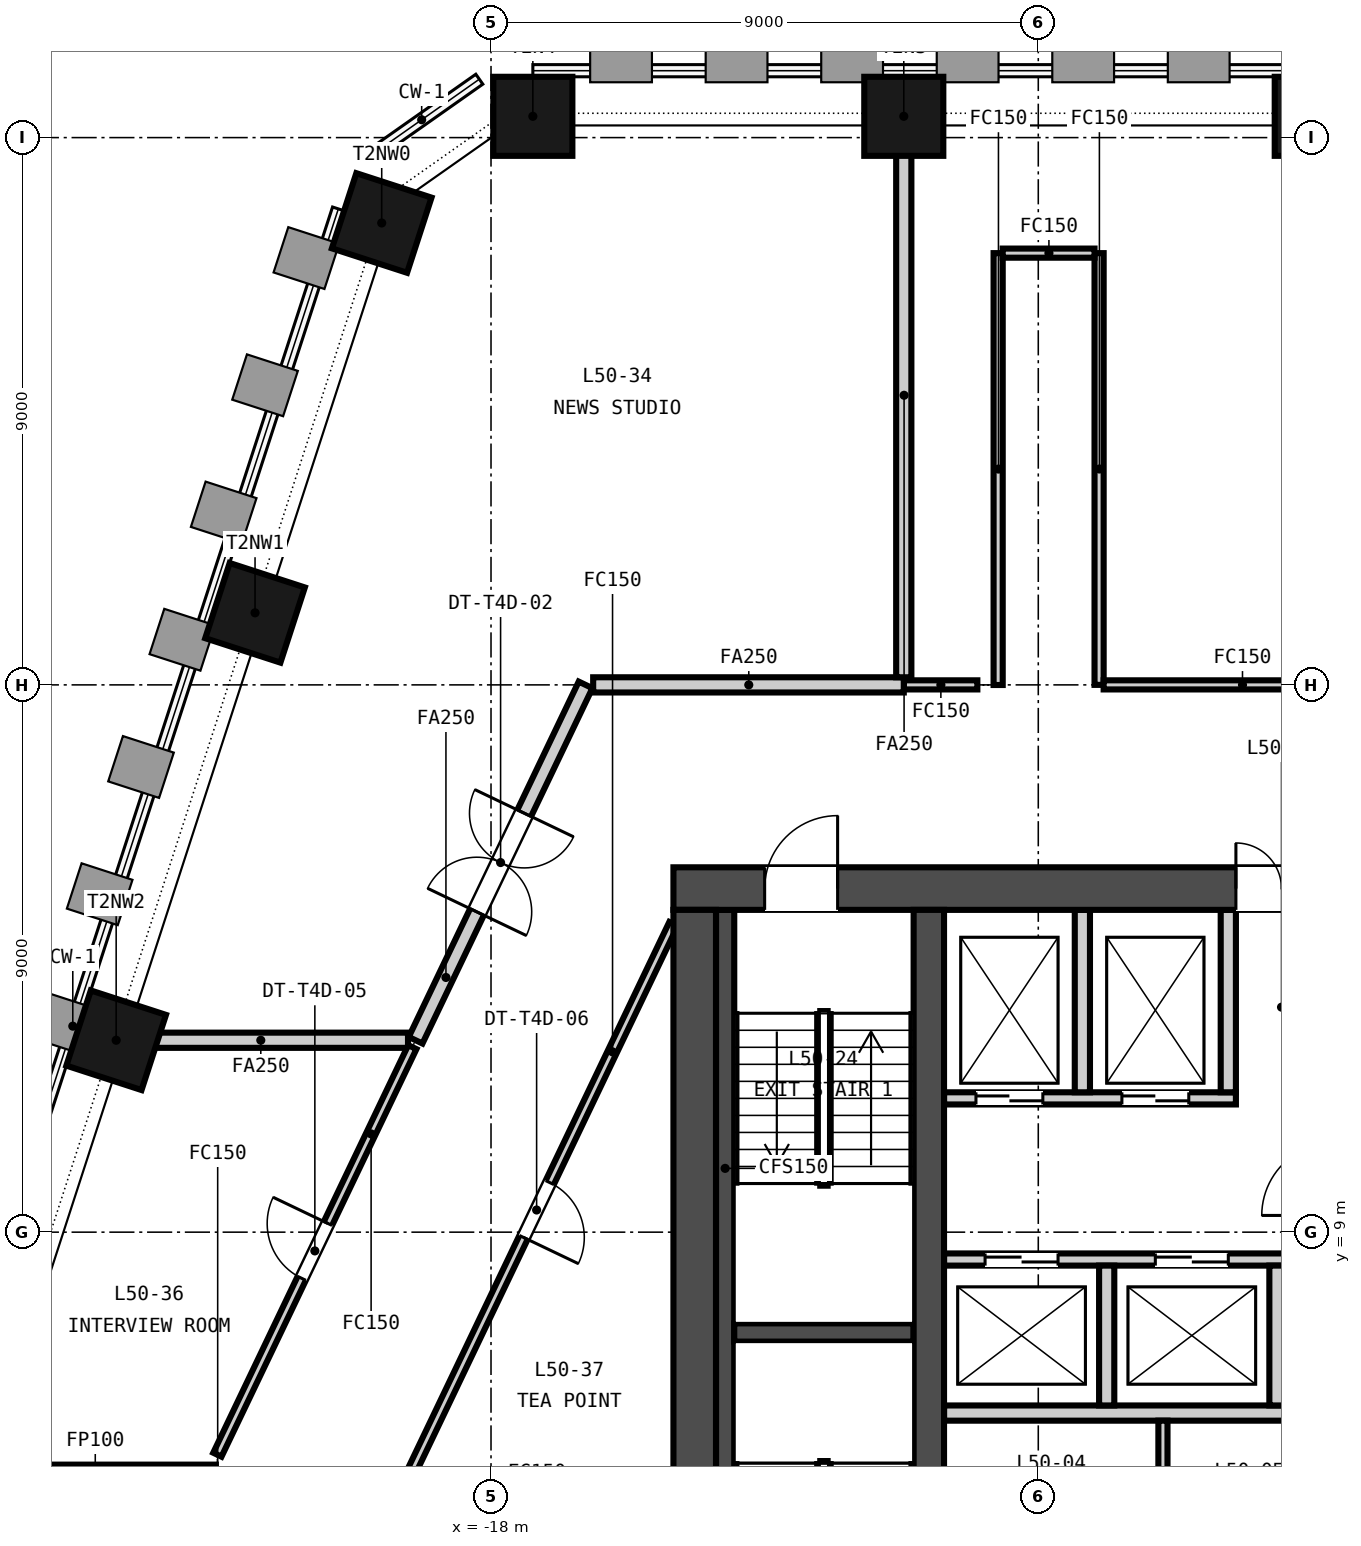
"""IFC4 building model, lengths in metres.
Left out: names, types, materials, properties, quantities, classifications, styles, units other than length and angle.
Written with IfcOpenShell. Run it as: python <this file> out.ifc"""

import sys

from ifc_helpers import new_model, si_unit, direction, frame, frame_2d, origin, origin_2d, place, context, subcontext, project, spatial, rectangle, extrude, element, fill, save


model = new_model("IFC4")
c1 = context("Model", 3, precision=1e-05, world=origin(), true_north=direction((0.0, 1.0)))
c2 = subcontext(c1, "Body", "Model", "MODEL_VIEW")
j1 = project(units=[si_unit("LENGTHUNIT", "METRE"), si_unit("PLANEANGLEUNIT", "RADIAN")], contexts=[c1])
p1 = place(None, origin())
s1 = spatial("IfcSite", under=j1, at=p1, CompositionType="ELEMENT")
p2 = place(p1, origin())
s2 = spatial("IfcBuilding", under=s1, at=p2, CompositionType="ELEMENT")
p3 = place(p2, frame((0.0, 0.0, 200.0)))
s3 = spatial("IfcBuildingStorey", under=s2, at=p3, CompositionType="ELEMENT", Elevation=200.0)
p4 = place(p3, frame((-15.0, 14.65, -0.15), z_axis=(0.0, 0.0, 1.0), x_axis=(1.0, 0.0, 0.0)))
e1 = element("IfcWall", 1, at=p4, inside=s3, PredefinedType="SOLIDWALL", context=c2, shape_type="SweptSolid", body=[
    extrude(rectangle(XDim=30.0, YDim=0.7, at=frame_2d((15.0, 0.0))), origin(), (0.0, 0.0, 1.0), 3.65),
])
p5 = place(p4, frame((9.25, 0.0, 0.15)))
e2 = element("IfcOpeningElement", 2, at=p5, cuts=e1, PredefinedType="OPENING", context=c2, shape_type="SweptSolid", body=[
    extrude(rectangle(XDim=1.5, YDim=2.1, at=frame_2d((0.75, 1.05))), frame((0.0, 0.36, 0.0), z_axis=(0.0, -1.0, 0.0), x_axis=(1.0, 0.0, 0.0)), (0.0, 0.0, 1.0), 0.72),
])
p6 = place(p4, frame((19.4, 0.0, 0.15)))
e3 = element("IfcOpeningElement", 3, at=p6, cuts=e1, PredefinedType="OPENING", context=c2, shape_type="SweptSolid", body=[
    extrude(rectangle(XDim=1.5, YDim=2.1, at=frame_2d((0.75, 1.05))), frame((0.0, 0.36, 0.0), z_axis=(0.0, -1.0, 0.0), x_axis=(1.0, 0.0, 0.0)), (0.0, 0.0, 1.0), 0.72),
])
p7 = place(p4, frame((1.5, 0.0, 0.15)))
e4 = element("IfcOpeningElement", 4, at=p7, cuts=e1, PredefinedType="OPENING", context=c2, shape_type="SweptSolid", body=[
    extrude(rectangle(XDim=1.2, YDim=2.1, at=frame_2d((0.6, 1.05))), frame((0.0, 0.36, 0.0), z_axis=(0.0, -1.0, 0.0), x_axis=(1.0, 0.0, 0.0)), (0.0, 0.0, 1.0), 0.72),
])
p8 = place(p4, frame((27.3, 0.0, 0.15)))
e5 = element("IfcOpeningElement", 5, at=p8, cuts=e1, PredefinedType="OPENING", context=c2, shape_type="SweptSolid", body=[
    extrude(rectangle(XDim=1.2, YDim=2.1, at=frame_2d((0.6, 1.05))), frame((0.0, 0.36, 0.0), z_axis=(0.0, -1.0, 0.0), x_axis=(1.0, 0.0, 0.0)), (0.0, 0.0, 1.0), 0.72),
])
p9 = place(p3, frame((-14.65, 0.7, -0.15), z_axis=(0.0, 0.0, 1.0), x_axis=(0.0, 1.0, 0.0)))
e6 = element("IfcWall", 6, at=p9, inside=s3, PredefinedType="SOLIDWALL", context=c2, shape_type="SweptSolid", body=[
    extrude(rectangle(XDim=13.6, YDim=0.7, at=frame_2d((6.8, 0.0))), origin(), (0.0, 0.0, 1.0), 3.65),
])
p10 = place(p3, frame((-10.8, 0.7, -0.15), z_axis=(0.0, 0.0, 1.0), x_axis=(0.0, 1.0, 0.0)))
e7 = element("IfcWall", 7, at=p10, inside=s3, PredefinedType="SOLIDWALL", context=c2, shape_type="SweptSolid", body=[
    extrude(rectangle(XDim=13.6, YDim=0.5, at=frame_2d((6.8, 0.0))), origin(), (0.0, 0.0, 1.0), 3.65),
])
for number, where, z_axis, x_axis in (
    (8, (-4.462, 27.35, -0.15), (0.0, 0.0, 1.0), (-1.0, 0.0, 0.0)),
    (9, (-11.212, 27.35, -0.15), (0.0, 0.0, 1.0), (-1.0, 0.0, 0.0)),
    (10, (-17.312, 27.35, -0.15), (0.0, 0.0, 1.0), (-1.0, 0.0, 0.0)),
    (11, (-19.798, 25.596, -0.15), (0.0, 0.0, 1.0), (-0.309, -0.951, 0.0)),
    (12, (-21.881, 19.185, -0.15), (0.0, 0.0, 1.0), (-0.309, -0.951, 0.0)),
    (13, (-24.164, 12.156, -0.15), (0.0, 0.0, 1.0), (-0.309, -0.951, 0.0)),
):
    element("IfcColumn", number, at=place(p3, frame(where, z_axis=z_axis, x_axis=x_axis)), inside=s3, PredefinedType="COLUMN", context=c2, shape_type="SweptSolid", body=[
        extrude(rectangle(XDim=1.3, YDim=1.3, at=origin_2d()), origin(), (0.0, 0.0, 1.0), 3.65),
    ])
p11 = place(p3, frame((-10.55, 6.025, 0.0), z_axis=(0.0, 0.0, 1.0), x_axis=(1.0, 0.0, 0.0)))
e14 = element("IfcWall", 14, at=p11, inside=s3, PredefinedType="PARTITIONING", context=c2, shape_type="SweptSolid", body=[
    extrude(rectangle(XDim=21.1, YDim=0.25, at=frame_2d((10.55, 0.0))), origin(), (0.0, 0.0, 1.0), 3.5),
])
p12 = place(p3, frame((-10.55, 8.55, 0.0), z_axis=(0.0, 0.0, 1.0), x_axis=(1.0, 0.0, 0.0)))
e15 = element("IfcWall", 15, at=p12, inside=s3, PredefinedType="PARTITIONING", context=c2, shape_type="SweptSolid", body=[
    extrude(rectangle(XDim=21.1, YDim=0.2, at=frame_2d((10.55, 0.0))), origin(), (0.0, 0.0, 1.0), 3.5),
])
p13 = place(p12, frame((0.675, 0.0, 0.0)))
e16 = element("IfcOpeningElement", 16, at=p13, cuts=e15, PredefinedType="OPENING", context=c2, shape_type="SweptSolid", body=[
    extrude(rectangle(XDim=1.2, YDim=2.1, at=frame_2d((0.6, 1.05))), frame((0.0, 0.11, 0.0), z_axis=(0.0, -1.0, 0.0), x_axis=(1.0, 0.0, 0.0)), (0.0, 0.0, 1.0), 0.22),
])
p14 = place(p12, frame((3.475, 0.0, 0.0)))
e17 = element("IfcOpeningElement", 17, at=p14, cuts=e15, PredefinedType="OPENING", context=c2, shape_type="SweptSolid", body=[
    extrude(rectangle(XDim=1.2, YDim=2.1, at=frame_2d((0.6, 1.05))), frame((0.0, 0.11, 0.0), z_axis=(0.0, -1.0, 0.0), x_axis=(1.0, 0.0, 0.0)), (0.0, 0.0, 1.0), 0.22),
])
p15 = place(p12, frame((6.275, 0.0, 0.0)))
e18 = element("IfcOpeningElement", 18, at=p15, cuts=e15, PredefinedType="OPENING", context=c2, shape_type="SweptSolid", body=[
    extrude(rectangle(XDim=1.2, YDim=2.1, at=frame_2d((0.6, 1.05))), frame((0.0, 0.11, 0.0), z_axis=(0.0, -1.0, 0.0), x_axis=(1.0, 0.0, 0.0)), (0.0, 0.0, 1.0), 0.22),
])
p16 = place(p12, frame((9.075, 0.0, 0.0)))
e19 = element("IfcOpeningElement", 19, at=p16, cuts=e15, PredefinedType="OPENING", context=c2, shape_type="SweptSolid", body=[
    extrude(rectangle(XDim=1.2, YDim=2.1, at=frame_2d((0.6, 1.05))), frame((0.0, 0.11, 0.0), z_axis=(0.0, -1.0, 0.0), x_axis=(1.0, 0.0, 0.0)), (0.0, 0.0, 1.0), 0.22),
])
p17 = place(p12, frame((11.875, 0.0, 0.0)))
e20 = element("IfcOpeningElement", 20, at=p17, cuts=e15, PredefinedType="OPENING", context=c2, shape_type="SweptSolid", body=[
    extrude(rectangle(XDim=1.2, YDim=2.1, at=frame_2d((0.6, 1.05))), frame((0.0, 0.11, 0.0), z_axis=(0.0, -1.0, 0.0), x_axis=(1.0, 0.0, 0.0)), (0.0, 0.0, 1.0), 0.22),
])
p18 = place(p12, frame((14.675, 0.0, 0.0)))
e21 = element("IfcOpeningElement", 21, at=p18, cuts=e15, PredefinedType="OPENING", context=c2, shape_type="SweptSolid", body=[
    extrude(rectangle(XDim=1.2, YDim=2.1, at=frame_2d((0.6, 1.05))), frame((0.0, 0.11, 0.0), z_axis=(0.0, -1.0, 0.0), x_axis=(1.0, 0.0, 0.0)), (0.0, 0.0, 1.0), 0.22),
])
p19 = place(p12, frame((17.475, 0.0, 0.0)))
e22 = element("IfcOpeningElement", 22, at=p19, cuts=e15, PredefinedType="OPENING", context=c2, shape_type="SweptSolid", body=[
    extrude(rectangle(XDim=1.2, YDim=2.1, at=frame_2d((0.6, 1.05))), frame((0.0, 0.11, 0.0), z_axis=(0.0, -1.0, 0.0), x_axis=(1.0, 0.0, 0.0)), (0.0, 0.0, 1.0), 0.22),
])
p20 = place(p12, frame((19.9, 0.0, 0.0)))
e23 = element("IfcOpeningElement", 23, at=p20, cuts=e15, PredefinedType="OPENING", context=c2, shape_type="SweptSolid", body=[
    extrude(rectangle(XDim=0.9, YDim=2.1, at=frame_2d((0.45, 1.05))), frame((0.0, 0.11, 0.0), z_axis=(0.0, -1.0, 0.0), x_axis=(1.0, 0.0, 0.0)), (0.0, 0.0, 1.0), 0.22),
])
p21 = place(p3, frame((-10.55, 11.2, 0.0), z_axis=(0.0, 0.0, 1.0), x_axis=(1.0, 0.0, 0.0)))
e24 = element("IfcWall", 24, at=p21, inside=s3, PredefinedType="PARTITIONING", context=c2, shape_type="SweptSolid", body=[
    extrude(rectangle(XDim=4.8, YDim=0.2, at=frame_2d((2.4, 0.0))), origin(), (0.0, 0.0, 1.0), 3.5),
])
p22 = place(p21, frame((0.525, 0.0, 0.0)))
e25 = element("IfcOpeningElement", 25, at=p22, cuts=e24, PredefinedType="OPENING", context=c2, shape_type="SweptSolid", body=[
    extrude(rectangle(XDim=1.1, YDim=2.1, at=frame_2d((0.55, 1.05))), frame((0.0, 0.11, 0.0), z_axis=(0.0, -1.0, 0.0), x_axis=(1.0, 0.0, 0.0)), (0.0, 0.0, 1.0), 0.22),
])
p23 = place(p21, frame((2.925, 0.0, 0.0)))
e26 = element("IfcOpeningElement", 26, at=p23, cuts=e24, PredefinedType="OPENING", context=c2, shape_type="SweptSolid", body=[
    extrude(rectangle(XDim=1.1, YDim=2.1, at=frame_2d((0.55, 1.05))), frame((0.0, 0.11, 0.0), z_axis=(0.0, -1.0, 0.0), x_axis=(1.0, 0.0, 0.0)), (0.0, 0.0, 1.0), 0.22),
])
p24 = place(p3, frame((-6.95, 3.6, 0.0), z_axis=(0.0, 0.0, 1.0), x_axis=(0.0, 1.0, 0.0)))
e27 = element("IfcWall", 27, at=p24, inside=s3, PredefinedType="PARTITIONING", context=c2, shape_type="SweptSolid", body=[
    extrude(rectangle(XDim=2.3, YDim=0.15, at=frame_2d((1.15, 0.0))), origin(), (0.0, 0.0, 1.0), 3.5),
])
for number, where, z_axis, x_axis in (
    (28, (-7.875, 6.15, 0.0), (0.0, 0.0, 1.0), (0.0, 1.0, 0.0)),
    (29, (-5.075, 6.15, 0.0), (0.0, 0.0, 1.0), (0.0, 1.0, 0.0)),
):
    element("IfcWall", number, at=place(p3, frame(where, z_axis=z_axis, x_axis=x_axis)), inside=s3, PredefinedType="PARTITIONING", context=c2, shape_type="SweptSolid", body=[
        extrude(rectangle(XDim=2.3, YDim=0.25, at=frame_2d((1.15, 0.0))), origin(), (0.0, 0.0, 1.0), 3.5),
    ])
for number, where, z_axis, x_axis in (
    (30, (-8.275, 11.3, 0.0), (0.0, 0.0, 1.0), (0.0, 1.0, 0.0)),
    (31, (-5.875, 11.3, 0.0), (0.0, 0.0, 1.0), (0.0, 1.0, 0.0)),
):
    element("IfcWall", number, at=place(p3, frame(where, z_axis=z_axis, x_axis=x_axis)), inside=s3, PredefinedType="PARTITIONING", context=c2, shape_type="SweptSolid", body=[
        extrude(rectangle(XDim=3.0, YDim=0.25, at=frame_2d((1.5, 0.0))), origin(), (0.0, 0.0, 1.0), 3.5),
    ])
p25 = place(p3, frame((-14.0, 7.35, 0.0), z_axis=(0.0, 0.0, 1.0), x_axis=(1.0, 0.0, 0.0)))
e32 = element("IfcWall", 32, at=p25, inside=s3, PredefinedType="SOLIDWALL", context=c2, shape_type="SweptSolid", body=[
    extrude(rectangle(XDim=2.95, YDim=0.3, at=frame_2d((1.475, 0.0))), origin(), (0.0, 0.0, 1.0), 3.5),
])
p26 = place(p3, frame((-14.15, 0.7, 0.0), z_axis=(0.0, 0.0, 1.0), x_axis=(0.0, 1.0, 0.0)))
e33 = element("IfcWall", 33, at=p26, inside=s3, PredefinedType="SOLIDWALL", context=c2, shape_type="SweptSolid", body=[
    extrude(rectangle(XDim=13.6, YDim=0.3, at=frame_2d((6.8, 0.0))), origin(), (0.0, 0.0, 1.0), 3.5),
])
p27 = place(p3, frame((-8.0, 25.1, 0.0), z_axis=(0.0, 0.0, 1.0), x_axis=(0.0, -1.0, 0.0)))
e34 = element("IfcWall", 34, at=p27, inside=s3, PredefinedType="PARTITIONING", context=c2, shape_type="SweptSolid", body=[
    extrude(rectangle(XDim=7.1, YDim=0.15, at=frame_2d((3.55, 0.0))), origin(), (0.0, 0.0, 1.0), 2.741),
])
p28 = place(p3, frame((-15.0, 14.069, 0.0), z_axis=(0.0, 0.0, 1.0), x_axis=(-0.43146462293, -0.902129857149, 0.0)))
e35 = element("IfcWall", 35, at=p28, inside=s3, PredefinedType="PARTITIONING", context=c2, shape_type="SweptSolid", body=[
    extrude(rectangle(XDim=10.413, YDim=0.15, at=frame_2d((5.207, 0.0))), origin(), (0.0, 0.0, 1.0), 2.741),
])
p29 = place(p28, frame((4.715, 0.0, 0.0)))
e36 = element("IfcOpeningElement", 36, at=p29, cuts=e35, PredefinedType="OPENING", context=c2, shape_type="SweptSolid", body=[
    extrude(rectangle(XDim=1.0, YDim=2.1, at=frame_2d((0.5, 1.05))), frame((0.0, 0.085, 0.0), z_axis=(0.0, -1.0, 0.0), x_axis=(1.0, 0.0, 0.0)), (0.0, 0.0, 1.0), 0.17),
])
p30 = place(p3, frame((-11.212, 18.0, 0.0), z_axis=(0.0, 0.0, 1.0), x_axis=(1.0, 0.0, 0.0)))
e37 = element("IfcWall", 37, at=p30, inside=s3, PredefinedType="PARTITIONING", context=c2, shape_type="SweptSolid", body=[
    extrude(rectangle(XDim=1.21, YDim=0.15, at=frame_2d((0.605, 0.0))), origin(), (0.0, 0.0, 1.0), 2.741),
])
p31 = place(p3, frame((-9.66, 17.998, 0.0), z_axis=(0.0, 0.0, 1.0), x_axis=(0.0, 1.0, 0.0)))
e38 = element("IfcWall", 38, at=p31, inside=s3, PredefinedType="PARTITIONING", context=c2, shape_type="SweptSolid", body=[
    extrude(rectangle(XDim=7.102, YDim=0.15, at=frame_2d((3.551, 0.0))), origin(), (0.0, 0.0, 1.0), 2.741),
])
p32 = place(p3, frame((-9.585, 25.1, 0.0), z_axis=(0.0, 0.0, 1.0), x_axis=(1.0, 0.0, 0.0)))
e39 = element("IfcWall", 39, at=p32, inside=s3, PredefinedType="PARTITIONING", context=c2, shape_type="SweptSolid", body=[
    extrude(rectangle(XDim=1.51, YDim=0.15, at=frame_2d((0.755, 0.0))), origin(), (0.0, 0.0, 1.0), 2.741),
])
p33 = place(p3, frame((-7.925, 18.0, 0.0), z_axis=(0.0, 0.0, 1.0), x_axis=(1.0, 0.0, 0.0)))
e40 = element("IfcWall", 40, at=p33, inside=s3, PredefinedType="PARTITIONING", context=c2, shape_type="SweptSolid", body=[
    extrude(rectangle(XDim=10.213, YDim=0.15, at=frame_2d((5.106, 0.0))), origin(), (0.0, 0.0, 1.0), 2.741),
])
p34 = place(p33, frame((4.606, 0.0, 0.0)))
e41 = element("IfcOpeningElement", 41, at=p34, cuts=e40, PredefinedType="OPENING", context=c2, shape_type="SweptSolid", body=[
    extrude(rectangle(XDim=1.0, YDim=2.1, at=frame_2d((0.5, 1.05))), frame((0.0, 0.085, 0.0), z_axis=(0.0, -1.0, 0.0), x_axis=(1.0, 0.0, 0.0)), (0.0, 0.0, 1.0), 0.17),
])
p35 = place(p3, frame((-19.24, 12.156, 0.0), z_axis=(0.0, 0.0, 1.0), x_axis=(0.43145149658, 0.902136135014, 0.0)))
e42 = element("IfcWall", 42, at=p35, inside=s3, PredefinedType="PARTITIONING", context=c2, shape_type="SweptSolid", body=[
    extrude(rectangle(XDim=6.478, YDim=0.25, at=frame_2d((3.239, 0.0))), origin(), (0.0, 0.0, 1.0), 2.741),
])
p36 = place(p35, frame((2.339, 0.0, 0.0)))
e43 = element("IfcOpeningElement", 43, at=p36, cuts=e42, PredefinedType="OPENING", context=c2, shape_type="SweptSolid", body=[
    extrude(rectangle(XDim=1.8, YDim=2.1, at=frame_2d((0.9, 1.05))), frame((0.0, 0.135, 0.0), z_axis=(0.0, -1.0, 0.0), x_axis=(1.0, 0.0, 0.0)), (0.0, 0.0, 1.0), 0.27),
])
p37 = place(p3, frame((-16.32, 18.0, 0.0), z_axis=(0.0, 0.0, 1.0), x_axis=(1.0, 0.0, 0.0)))
e44 = element("IfcWall", 44, at=p37, inside=s3, PredefinedType="PARTITIONING", context=c2, shape_type="SweptSolid", body=[
    extrude(rectangle(XDim=5.108, YDim=0.25, at=frame_2d((2.554, 0.0))), origin(), (0.0, 0.0, 1.0), 2.741),
])
p38 = place(p3, frame((-11.212, 18.125, 0.0), z_axis=(0.0, 0.0, 1.0), x_axis=(0.0, 1.0, 0.0)))
e45 = element("IfcWall", 45, at=p38, inside=s3, PredefinedType="PARTITIONING", context=c2, shape_type="SweptSolid", body=[
    extrude(rectangle(XDim=9.275, YDim=0.25, at=frame_2d((4.637, 0.0))), origin(), (0.0, 0.0, 1.0), 2.741),
])
p39 = place(p3, frame((-24.217, 12.156, 0.0), z_axis=(0.0, 0.0, 1.0), x_axis=(1.0, 0.0, 0.0)))
e46 = element("IfcWall", 46, at=p39, inside=s3, PredefinedType="PARTITIONING", context=c2, shape_type="SweptSolid", body=[
    extrude(rectangle(XDim=4.852, YDim=0.25, at=frame_2d((2.426, 0.0))), origin(), (0.0, 0.0, 1.0), 2.741),
])
p40 = place(p3, frame((-22.5, 5.34, 0.0), z_axis=(0.0, 0.0, 1.0), x_axis=(0.431478749841, 0.902123100489, 0.0)))
e47 = element("IfcWall", 47, at=p40, inside=s3, PredefinedType="PARTITIONING", context=c2, shape_type="SweptSolid", body=[
    extrude(rectangle(XDim=7.43, YDim=0.15, at=frame_2d((3.715, 0.0))), origin(), (0.0, 0.0, 1.0), 2.741),
])
p41 = place(p40, frame((3.215, 0.0, 0.0)))
e48 = element("IfcOpeningElement", 48, at=p41, cuts=e47, PredefinedType="OPENING", context=c2, shape_type="SweptSolid", body=[
    extrude(rectangle(XDim=1.0, YDim=2.1, at=frame_2d((0.5, 1.05))), frame((0.0, 0.085, 0.0), z_axis=(0.0, -1.0, 0.0), x_axis=(1.0, 0.0, 0.0)), (0.0, 0.0, 1.0), 0.17),
])
p42 = place(p3, frame((-26.501, 5.127, 0.0), z_axis=(0.0, 0.0, 1.0), x_axis=(1.0, 0.0, 0.0)))
e49 = element("IfcWall", 49, at=p42, inside=s3, PredefinedType="PARTITIONING", context=c2, shape_type="SweptSolid", body=[
    extrude(rectangle(XDim=3.976, YDim=0.1, at=frame_2d((1.988, 0.0))), origin(), (0.0, 0.0, 1.0), 2.741),
])
p43 = place(p13, origin())
e50 = element("IfcDoor", 50, at=p43, inside=s3, OperationType="DOUBLE_DOOR_SLIDING", PredefinedType="DOOR", context=c2, shape_type="SweptSolid", body=[
    extrude(rectangle(XDim=1.2, YDim=2.1, at=frame_2d((0.6, 1.05))), frame((0.0, 0.025, 0.0), z_axis=(0.0, -1.0, 0.0), x_axis=(1.0, 0.0, 0.0)), (0.0, 0.0, 1.0), 0.05),
])
fill(e16, e50)
p44 = place(p14, origin())
e51 = element("IfcDoor", 51, at=p44, inside=s3, OperationType="DOUBLE_DOOR_SLIDING", PredefinedType="DOOR", context=c2, shape_type="SweptSolid", body=[
    extrude(rectangle(XDim=1.2, YDim=2.1, at=frame_2d((0.6, 1.05))), frame((0.0, 0.025, 0.0), z_axis=(0.0, -1.0, 0.0), x_axis=(1.0, 0.0, 0.0)), (0.0, 0.0, 1.0), 0.05),
])
fill(e17, e51)
p45 = place(p22, origin())
e52 = element("IfcDoor", 52, at=p45, inside=s3, OperationType="DOUBLE_DOOR_SLIDING", PredefinedType="DOOR", context=c2, shape_type="SweptSolid", body=[
    extrude(rectangle(XDim=1.1, YDim=2.1, at=frame_2d((0.55, 1.05))), frame((0.0, 0.025, 0.0), z_axis=(0.0, -1.0, 0.0), x_axis=(1.0, 0.0, 0.0)), (0.0, 0.0, 1.0), 0.05),
])
fill(e25, e52)
p46 = place(p23, origin())
e53 = element("IfcDoor", 53, at=p46, inside=s3, OperationType="DOUBLE_DOOR_SLIDING", PredefinedType="DOOR", context=c2, shape_type="SweptSolid", body=[
    extrude(rectangle(XDim=1.1, YDim=2.1, at=frame_2d((0.55, 1.05))), frame((0.0, 0.025, 0.0), z_axis=(0.0, -1.0, 0.0), x_axis=(1.0, 0.0, 0.0)), (0.0, 0.0, 1.0), 0.05),
])
fill(e26, e53)
p47 = place(p5, origin())
e54 = element("IfcDoor", 54, at=p47, inside=s3, OperationType="DOUBLE_DOOR_SINGLE_SWING", PredefinedType="DOOR", context=c2, shape_type="SweptSolid", body=[
    extrude(rectangle(XDim=1.5, YDim=2.1, at=frame_2d((0.75, 1.05))), frame((0.0, 0.025, 0.0), z_axis=(0.0, -1.0, 0.0), x_axis=(1.0, 0.0, 0.0)), (0.0, 0.0, 1.0), 0.05),
])
fill(e2, e54)
p48 = place(p7, origin())
e55 = element("IfcDoor", 55, at=p48, inside=s3, OperationType="SINGLE_SWING_RIGHT", PredefinedType="DOOR", context=c2, shape_type="SweptSolid", body=[
    extrude(rectangle(XDim=1.2, YDim=2.1, at=frame_2d((0.6, 1.05))), frame((0.0, 0.025, 0.0), z_axis=(0.0, -1.0, 0.0), x_axis=(1.0, 0.0, 0.0)), (0.0, 0.0, 1.0), 0.05),
])
fill(e4, e55)
p49 = place(p36, origin())
e56 = element("IfcDoor", 56, at=p49, inside=s3, OperationType="DOUBLE_DOOR_DOUBLE_SWING", PredefinedType="DOOR", context=c2, shape_type="SweptSolid", body=[
    extrude(rectangle(XDim=1.8, YDim=2.1, at=frame_2d((0.9, 1.05))), frame((0.0, 0.025, 0.0), z_axis=(0.0, -1.0, 0.0), x_axis=(1.0, 0.0, 0.0)), (0.0, 0.0, 1.0), 0.05),
])
fill(e43, e56)
p50 = place(p41, origin())
e57 = element("IfcDoor", 57, at=p50, inside=s3, OperationType="SINGLE_SWING_RIGHT", PredefinedType="DOOR", context=c2, shape_type="SweptSolid", body=[
    extrude(rectangle(XDim=1.0, YDim=2.1, at=frame_2d((0.5, 1.05))), frame((0.0, 0.025, 0.0), z_axis=(0.0, -1.0, 0.0), x_axis=(1.0, 0.0, 0.0)), (0.0, 0.0, 1.0), 0.05),
])
fill(e48, e57)
p51 = place(p29, origin())
e58 = element("IfcDoor", 58, at=p51, inside=s3, OperationType="SINGLE_SWING_RIGHT", PredefinedType="DOOR", context=c2, shape_type="SweptSolid", body=[
    extrude(rectangle(XDim=1.0, YDim=2.1, at=frame_2d((0.5, 1.05))), frame((0.0, 0.025, 0.0), z_axis=(0.0, -1.0, 0.0), x_axis=(1.0, 0.0, 0.0)), (0.0, 0.0, 1.0), 0.05),
])
fill(e36, e58)
save(model, sys.argv[1])
